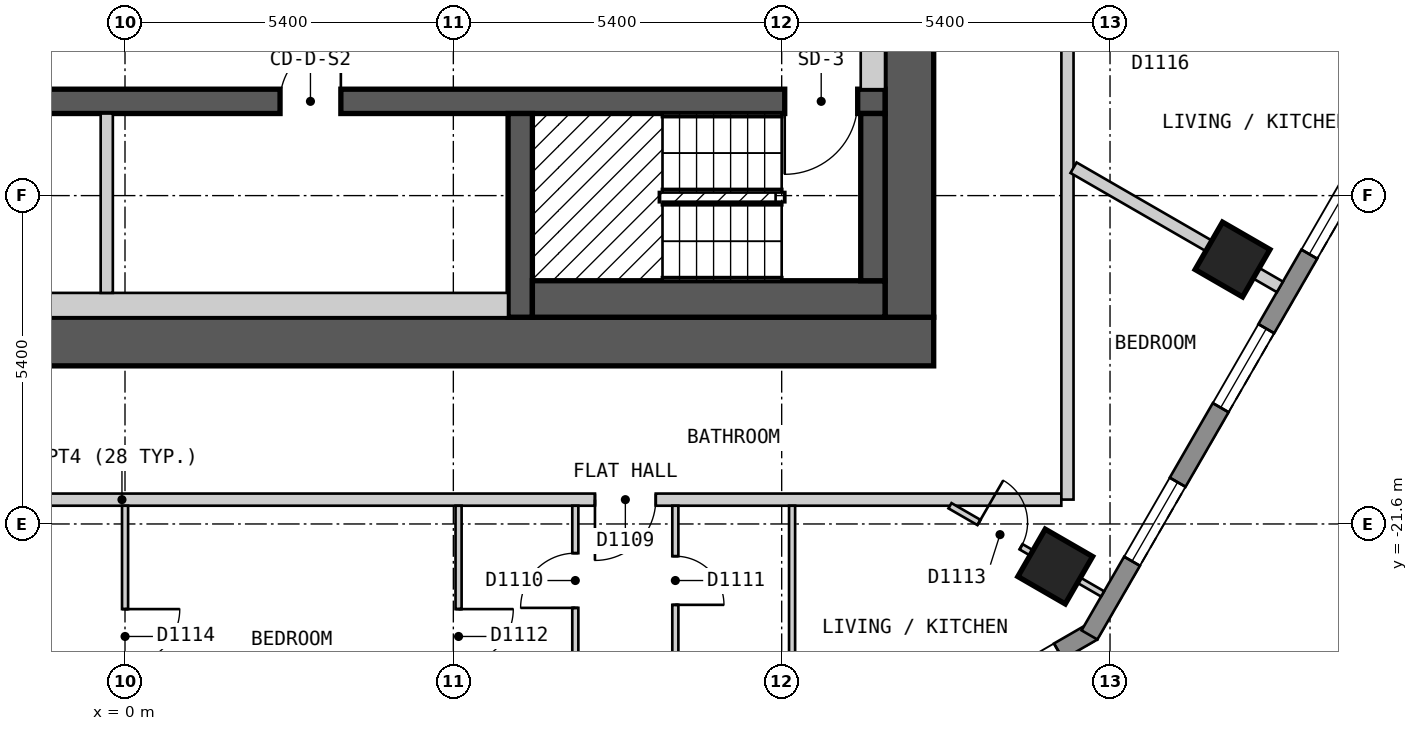
"""IFC4 building model, lengths in metres.
Left out: names, types, materials, properties, quantities, classifications, styles, units other than length and angle.
Written with IfcOpenShell. Run it as: python <this file> out.ifc"""

import sys

from ifc_helpers import new_model, si_unit, direction, frame, frame_2d, origin, origin_2d, place, context, subcontext, project, spatial, polyline, rectangle, outline, extrude, element, fill, save


model = new_model("IFC4")
c1 = context("Model", 3, precision=1e-05, world=origin(), true_north=direction((0.0, 1.0)))
c2 = subcontext(c1, "Body", "Model", "MODEL_VIEW")
j1 = project(units=[si_unit("LENGTHUNIT", "METRE"), si_unit("PLANEANGLEUNIT", "RADIAN")], contexts=[c1])
p1 = place(None, origin())
s1 = spatial("IfcSite", under=j1, at=p1, CompositionType="ELEMENT")
p2 = place(p1, origin())
s2 = spatial("IfcBuilding", under=s1, at=p2, CompositionType="ELEMENT")
p3 = place(p2, frame((0.0, 0.0, 150.6)))
s3 = spatial("IfcBuildingStorey", under=s2, at=p3, CompositionType="ELEMENT", Elevation=150.6)
for number, where, z_axis, x_axis in (
    (1, (15.299, -22.3, 0.0), (0.0, 0.0, 1.0), (0.5, 0.866, 0.0)),
    (2, (18.215, -17.251, 0.0), (0.0, 0.0, 1.0), (0.5, 0.866, 0.0)),
):
    element("IfcColumn", number, at=place(p3, frame(where, z_axis=z_axis, x_axis=x_axis)), inside=s3, PredefinedType="COLUMN", context=c2, shape_type="SweptSolid", body=[
        extrude(rectangle(XDim=0.9, YDim=0.9, at=origin_2d()), origin(), (0.0, 0.0, 1.0), 3.0),
    ])
p4 = place(p3, frame((-13.3, -18.6, 0.0), z_axis=(0.0, 0.0, 1.0), x_axis=(1.0, 0.0, 0.0)))
e3 = element("IfcWall", 3, at=p4, inside=s3, PredefinedType="SHEAR", context=c2, shape_type="SweptSolid", body=[
    extrude(rectangle(XDim=26.6, YDim=0.8, at=frame_2d((13.3, 0.0))), origin(), (0.0, 0.0, 1.0), 2.6),
])
p5 = place(p3, frame((12.9, -18.2, 0.0), z_axis=(0.0, 0.0, 1.0), x_axis=(0.0, 1.0, 0.0)))
e4 = element("IfcWall", 4, at=p5, inside=s3, PredefinedType="SHEAR", context=c2, shape_type="SweptSolid", body=[
    extrude(rectangle(XDim=12.4, YDim=0.8, at=frame_2d((6.2, 0.0))), origin(), (0.0, 0.0, 1.0), 2.6),
])
p6 = place(p3, frame((-12.5, -14.65, 0.0), z_axis=(0.0, 0.0, 1.0), x_axis=(1.0, 0.0, 0.0)))
e5 = element("IfcWall", 5, at=p6, inside=s3, PredefinedType="SHEAR", context=c2, shape_type="SweptSolid", body=[
    extrude(rectangle(XDim=25.0, YDim=0.4, at=frame_2d((12.5, 0.0))), origin(), (0.0, 0.0, 1.0), 2.6),
])
p7 = place(p6, frame((1.7, 0.0, 0.0), z_axis=(0.0, 0.0, 1.0), x_axis=(-1.0, 0.0, 0.0)))
e6 = element("IfcOpeningElement", 6, at=p7, cuts=e5, PredefinedType="OPENING", context=c2, shape_type="SweptSolid", body=[
    extrude(rectangle(XDim=1.2, YDim=2.1, at=frame_2d((0.6, 1.05))), frame((0.0, 0.21, 0.0), z_axis=(0.0, -1.0, 0.0), x_axis=(1.0, 0.0, 0.0)), (0.0, 0.0, 1.0), 0.42),
])
p8 = place(p6, frame((24.55, 0.0, 0.0), z_axis=(0.0, 0.0, 1.0), x_axis=(-1.0, 0.0, 0.0)))
e7 = element("IfcOpeningElement", 7, at=p8, cuts=e5, PredefinedType="OPENING", context=c2, shape_type="SweptSolid", body=[
    extrude(rectangle(XDim=1.2, YDim=2.1, at=frame_2d((0.6, 1.05))), frame((0.0, 0.21, 0.0), z_axis=(0.0, -1.0, 0.0), x_axis=(1.0, 0.0, 0.0)), (0.0, 0.0, 1.0), 0.42),
])
p9 = place(p6, frame((9.65, 0.0, 0.0), z_axis=(0.0, 0.0, 1.0), x_axis=(-1.0, 0.0, 0.0)))
e8 = element("IfcOpeningElement", 8, at=p9, cuts=e5, PredefinedType="OPENING", context=c2, shape_type="SweptSolid", body=[
    extrude(rectangle(XDim=1.0, YDim=2.1, at=frame_2d((0.5, 1.05))), frame((0.0, 0.21, 0.0), z_axis=(0.0, -1.0, 0.0), x_axis=(1.0, 0.0, 0.0)), (0.0, 0.0, 1.0), 0.42),
])
p10 = place(p6, frame((16.05, 0.0, 0.0), z_axis=(0.0, 0.0, 1.0), x_axis=(-1.0, 0.0, 0.0)))
e9 = element("IfcOpeningElement", 9, at=p10, cuts=e5, PredefinedType="OPENING", context=c2, shape_type="SweptSolid", body=[
    extrude(rectangle(XDim=1.0, YDim=2.1, at=frame_2d((0.5, 1.05))), frame((0.0, 0.21, 0.0), z_axis=(0.0, -1.0, 0.0), x_axis=(1.0, 0.0, 0.0)), (0.0, 0.0, 1.0), 0.42),
])
p11 = place(p3, frame((6.5, -18.2, 0.0), z_axis=(0.0, 0.0, 1.0), x_axis=(0.0, 1.0, 0.0)))
e10 = element("IfcWall", 10, at=p11, inside=s3, PredefinedType="SHEAR", context=c2, shape_type="SweptSolid", body=[
    extrude(rectangle(XDim=3.35, YDim=0.4, at=frame_2d((1.675, 0.0))), origin(), (0.0, 0.0, 1.0), 2.6),
])
p12 = place(p3, frame((11.587, -25.87, 0.0), z_axis=(0.0, 0.0, 1.0), x_axis=(0.866022959057, 0.500004234368, 0.0)))
e11 = element("IfcWall", 11, at=p12, inside=s3, PredefinedType="SOLIDWALL", context=c2, shape_type="SweptSolid", body=[
    extrude(outline(polyline([(0.0, -0.15), (5.0, -0.15), (4.92, 0.15), (0.08, 0.15), (0.0, -0.15)])), origin(), (0.0, 0.0, 1.0), 2.6),
])
p13 = place(p12, frame((0.65, 0.0, 0.15)))
e12 = element("IfcOpeningElement", 12, at=p13, cuts=e11, PredefinedType="OPENING", context=c2, shape_type="SweptSolid", body=[
    extrude(rectangle(XDim=1.2, YDim=2.1, at=frame_2d((0.6, 1.05))), frame((0.0, 0.16, 0.0), z_axis=(0.0, -1.0, 0.0), x_axis=(1.0, 0.0, 0.0)), (0.0, 0.0, 1.0), 0.32),
])
p14 = place(p12, frame((3.149, 0.0, 0.15)))
e13 = element("IfcOpeningElement", 13, at=p14, cuts=e11, PredefinedType="OPENING", context=c2, shape_type="SweptSolid", body=[
    extrude(rectangle(XDim=1.2, YDim=2.1, at=frame_2d((0.6, 1.05))), frame((0.0, 0.16, 0.0), z_axis=(0.0, -1.0, 0.0), x_axis=(1.0, 0.0, 0.0)), (0.0, 0.0, 1.0), 0.32),
])
p15 = place(p3, frame((15.862, -23.425, 0.0), z_axis=(0.0, 0.0, 1.0), x_axis=(0.500017503135, 0.866015298109, 0.0)))
e14 = element("IfcWall", 14, at=p15, inside=s3, PredefinedType="SOLIDWALL", context=c2, shape_type="SweptSolid", body=[
    extrude(outline(polyline([(0.0, -0.15), (24.711, -0.15), (24.631, 0.15), (0.08, 0.15), (0.0, -0.15)])), origin(), (0.0, 0.0, 1.0), 2.6),
])
p16 = place(p15, frame((1.4, 0.0, 0.15)))
e15 = element("IfcOpeningElement", 15, at=p16, cuts=e14, PredefinedType="OPENING", context=c2, shape_type="SweptSolid", body=[
    extrude(rectangle(XDim=1.5, YDim=2.1, at=frame_2d((0.75, 1.05))), frame((0.0, 0.16, 0.0), z_axis=(0.0, -1.0, 0.0), x_axis=(1.0, 0.0, 0.0)), (0.0, 0.0, 1.0), 0.32),
])
p17 = place(p15, frame((4.316, 0.0, 0.15)))
e16 = element("IfcOpeningElement", 16, at=p17, cuts=e14, PredefinedType="OPENING", context=c2, shape_type="SweptSolid", body=[
    extrude(rectangle(XDim=1.5, YDim=2.1, at=frame_2d((0.75, 1.05))), frame((0.0, 0.16, 0.0), z_axis=(0.0, -1.0, 0.0), x_axis=(1.0, 0.0, 0.0)), (0.0, 0.0, 1.0), 0.32),
])
p18 = place(p15, frame((7.231, 0.0, 0.15)))
e17 = element("IfcOpeningElement", 17, at=p18, cuts=e14, PredefinedType="OPENING", context=c2, shape_type="SweptSolid", body=[
    extrude(rectangle(XDim=1.5, YDim=2.1, at=frame_2d((0.75, 1.05))), frame((0.0, 0.16, 0.0), z_axis=(0.0, -1.0, 0.0), x_axis=(1.0, 0.0, 0.0)), (0.0, 0.0, 1.0), 0.32),
])
p19 = place(p15, frame((10.147, 0.0, 0.15)))
e18 = element("IfcOpeningElement", 18, at=p19, cuts=e14, PredefinedType="OPENING", context=c2, shape_type="SweptSolid", body=[
    extrude(rectangle(XDim=1.5, YDim=2.1, at=frame_2d((0.75, 1.05))), frame((0.0, 0.16, 0.0), z_axis=(0.0, -1.0, 0.0), x_axis=(1.0, 0.0, 0.0)), (0.0, 0.0, 1.0), 0.32),
])
p20 = place(p15, frame((13.062, 0.0, 0.15)))
e19 = element("IfcOpeningElement", 19, at=p20, cuts=e14, PredefinedType="OPENING", context=c2, shape_type="SweptSolid", body=[
    extrude(rectangle(XDim=1.5, YDim=2.1, at=frame_2d((0.75, 1.05))), frame((0.0, 0.16, 0.0), z_axis=(0.0, -1.0, 0.0), x_axis=(1.0, 0.0, 0.0)), (0.0, 0.0, 1.0), 0.32),
])
p21 = place(p15, frame((15.977, 0.0, 0.15)))
e20 = element("IfcOpeningElement", 20, at=p21, cuts=e14, PredefinedType="OPENING", context=c2, shape_type="SweptSolid", body=[
    extrude(rectangle(XDim=1.5, YDim=2.1, at=frame_2d((0.75, 1.05))), frame((0.0, 0.16, 0.0), z_axis=(0.0, -1.0, 0.0), x_axis=(1.0, 0.0, 0.0)), (0.0, 0.0, 1.0), 0.32),
])
p22 = place(p15, frame((18.893, 0.0, 0.15)))
e21 = element("IfcOpeningElement", 21, at=p22, cuts=e14, PredefinedType="OPENING", context=c2, shape_type="SweptSolid", body=[
    extrude(rectangle(XDim=1.5, YDim=2.1, at=frame_2d((0.75, 1.05))), frame((0.0, 0.16, 0.0), z_axis=(0.0, -1.0, 0.0), x_axis=(1.0, 0.0, 0.0)), (0.0, 0.0, 1.0), 0.32),
])
p23 = place(p15, frame((21.809, 0.0, 0.15)))
e22 = element("IfcOpeningElement", 22, at=p23, cuts=e14, PredefinedType="OPENING", context=c2, shape_type="SweptSolid", body=[
    extrude(rectangle(XDim=1.5, YDim=2.1, at=frame_2d((0.75, 1.05))), frame((0.0, 0.16, 0.0), z_axis=(0.0, -1.0, 0.0), x_axis=(1.0, 0.0, 0.0)), (0.0, 0.0, 1.0), 0.32),
])
p24 = place(p3, frame((-15.499, -21.2, 0.0), z_axis=(0.0, 0.0, 1.0), x_axis=(1.0, 0.0, 0.0)))
e23 = element("IfcWall", 23, at=p24, inside=s3, PredefinedType="PARTITIONING", context=c2, shape_type="SweptSolid", body=[
    extrude(rectangle(XDim=30.898, YDim=0.2, at=frame_2d((15.449, 0.0))), origin(), (0.0, 0.0, 1.0), 2.6),
])
p25 = place(p24, frame((6.773, 0.0, 0.0)))
e24 = element("IfcOpeningElement", 24, at=p25, cuts=e23, PredefinedType="OPENING", context=c2, shape_type="SweptSolid", body=[
    extrude(rectangle(XDim=1.0, YDim=2.1, at=frame_2d((0.5, 1.05))), frame((0.0, 0.11, 0.0), z_axis=(0.0, -1.0, 0.0), x_axis=(1.0, 0.0, 0.0)), (0.0, 0.0, 1.0), 0.22),
])
p26 = place(p24, frame((23.228, 0.0, 0.0)))
e25 = element("IfcOpeningElement", 25, at=p26, cuts=e23, PredefinedType="OPENING", context=c2, shape_type="SweptSolid", body=[
    extrude(rectangle(XDim=1.0, YDim=2.1, at=frame_2d((0.5, 1.05))), frame((0.0, 0.11, 0.0), z_axis=(0.0, -1.0, 0.0), x_axis=(1.0, 0.0, 0.0)), (0.0, 0.0, 1.0), 0.22),
])
p27 = place(p3, frame((15.5, -21.199, 0.0), z_axis=(0.0, 0.0, 1.0), x_axis=(0.0, 1.0, 0.0)))
e26 = element("IfcWall", 26, at=p27, inside=s3, PredefinedType="PARTITIONING", context=c2, shape_type="SweptSolid", body=[
    extrude(rectangle(XDim=12.147, YDim=0.2, at=frame_2d((6.073, 0.0))), origin(), (0.0, 0.0, 1.0), 2.6),
])
p28 = place(p27, frame((8.348, 0.0, 0.0)))
e27 = element("IfcOpeningElement", 27, at=p28, cuts=e26, PredefinedType="OPENING", context=c2, shape_type="SweptSolid", body=[
    extrude(rectangle(XDim=1.0, YDim=2.1, at=frame_2d((0.5, 1.05))), frame((0.0, 0.11, 0.0), z_axis=(0.0, -1.0, 0.0), x_axis=(1.0, 0.0, 0.0)), (0.0, 0.0, 1.0), 0.22),
])
p29 = place(p3, frame((7.406, -21.3, 0.0), z_axis=(0.0, 0.0, 1.0), x_axis=(0.0, -1.0, 0.0)))
e28 = element("IfcWall", 28, at=p29, inside=s3, PredefinedType="PARTITIONING", context=c2, shape_type="SweptSolid", body=[
    extrude(rectangle(XDim=2.509, YDim=0.1, at=frame_2d((1.254, 0.0))), origin(), (0.0, 0.0, 1.0), 2.6),
])
p30 = place(p29, frame((0.78, 0.0, 0.0)))
e29 = element("IfcOpeningElement", 29, at=p30, cuts=e28, PredefinedType="OPENING", context=c2, shape_type="SweptSolid", body=[
    extrude(rectangle(XDim=0.9, YDim=2.1, at=frame_2d((0.45, 1.05))), frame((0.0, 0.06, 0.0), z_axis=(0.0, -1.0, 0.0), x_axis=(1.0, 0.0, 0.0)), (0.0, 0.0, 1.0), 0.12),
])
p31 = place(p3, frame((13.568, -21.3, 0.0), z_axis=(0.0, 0.0, 1.0), x_axis=(0.865885342641, -0.500242514586, 0.0)))
e30 = element("IfcWall", 30, at=p31, inside=s3, PredefinedType="PARTITIONING", context=c2, shape_type="SweptSolid", body=[
    extrude(rectangle(XDim=2.898, YDim=0.1, at=frame_2d((1.449, 0.0))), origin(), (0.0, 0.0, 1.0), 2.6),
])
p32 = place(p31, frame((0.55, 0.0, 0.0)))
e31 = element("IfcOpeningElement", 31, at=p32, cuts=e30, PredefinedType="OPENING", context=c2, shape_type="SweptSolid", body=[
    extrude(rectangle(XDim=0.8, YDim=2.1, at=frame_2d((0.4, 1.05))), frame((0.0, 0.06, 0.0), z_axis=(0.0, -1.0, 0.0), x_axis=(1.0, 0.0, 0.0)), (0.0, 0.0, 1.0), 0.12),
])
p33 = place(p3, frame((5.486, -25.7, 0.0), z_axis=(0.0, 0.0, 1.0), x_axis=(0.0, 1.0, 0.0)))
e32 = element("IfcWall", 32, at=p33, inside=s3, PredefinedType="PARTITIONING", context=c2, shape_type="SweptSolid", body=[
    extrude(rectangle(XDim=4.4, YDim=0.1, at=frame_2d((2.2, 0.0))), origin(), (0.0, 0.0, 1.0), 2.6),
])
p34 = place(p33, frame((1.8, 0.0, 0.0)))
e33 = element("IfcOpeningElement", 33, at=p34, cuts=e32, PredefinedType="OPENING", context=c2, shape_type="SweptSolid", body=[
    extrude(rectangle(XDim=0.9, YDim=2.1, at=frame_2d((0.45, 1.05))), frame((0.0, 0.06, 0.0), z_axis=(0.0, -1.0, 0.0), x_axis=(1.0, 0.0, 0.0)), (0.0, 0.0, 1.0), 0.12),
])
p35 = place(p3, frame((9.051, -23.81, 0.0), z_axis=(0.0, 0.0, 1.0), x_axis=(0.0, 1.0, 0.0)))
e34 = element("IfcWall", 34, at=p35, inside=s3, PredefinedType="PARTITIONING", context=c2, shape_type="SweptSolid", body=[
    extrude(rectangle(XDim=2.51, YDim=0.1, at=frame_2d((1.255, 0.0))), origin(), (0.0, 0.0, 1.0), 2.6),
])
p36 = place(p35, frame((0.88, 0.0, 0.0)))
e35 = element("IfcOpeningElement", 35, at=p36, cuts=e34, PredefinedType="OPENING", context=c2, shape_type="SweptSolid", body=[
    extrude(rectangle(XDim=0.8, YDim=2.1, at=frame_2d((0.4, 1.05))), frame((0.0, 0.06, 0.0), z_axis=(0.0, -1.0, 0.0), x_axis=(1.0, 0.0, 0.0)), (0.0, 0.0, 1.0), 0.12),
])
p37 = place(p3, frame((10.971, -23.859, 0.0), z_axis=(0.0, 0.0, 1.0), x_axis=(0.0, 1.0, 0.0)))
e36 = element("IfcWall", 36, at=p37, inside=s3, PredefinedType="PARTITIONING", context=c2, shape_type="SweptSolid", body=[
    extrude(rectangle(XDim=2.559, YDim=0.1, at=frame_2d((1.279, 0.0))), origin(), (0.0, 0.0, 1.0), 2.6),
])
p38 = place(p3, frame((0.001, -25.7, 0.0), z_axis=(0.0, 0.0, 1.0), x_axis=(0.0, 1.0, 0.0)))
e37 = element("IfcWall", 37, at=p38, inside=s3, PredefinedType="PARTITIONING", context=c2, shape_type="SweptSolid", body=[
    extrude(rectangle(XDim=4.4, YDim=0.1, at=frame_2d((2.2, 0.0))), origin(), (0.0, 0.0, 1.0), 2.6),
])
p39 = place(p38, frame((1.8, 0.0, 0.0)))
e38 = element("IfcOpeningElement", 38, at=p39, cuts=e37, PredefinedType="OPENING", context=c2, shape_type="SweptSolid", body=[
    extrude(rectangle(XDim=0.9, YDim=2.1, at=frame_2d((0.45, 1.05))), frame((0.0, 0.06, 0.0), z_axis=(0.0, -1.0, 0.0), x_axis=(1.0, 0.0, 0.0)), (0.0, 0.0, 1.0), 0.12),
])
p40 = place(p3, frame((15.6, -15.741, 0.0), z_axis=(0.0, 0.0, 1.0), x_axis=(0.865964599155, -0.500105301922, 0.0)))
e39 = element("IfcWall", 39, at=p40, inside=s3, PredefinedType="PARTITIONING", context=c2, shape_type="SweptSolid", body=[
    extrude(rectangle(XDim=3.919, YDim=0.2, at=frame_2d((1.959, 0.0))), origin(), (0.0, 0.0, 1.0), 2.6),
])
p41 = place(p3, frame((-6.3, -18.0, 0.0), z_axis=(0.0, 0.0, 1.0), x_axis=(1.0, 0.0, 0.0)))
e40 = element("IfcWall", 40, at=p41, inside=s3, PredefinedType="PARTITIONING", context=c2, shape_type="SweptSolid", body=[
    extrude(rectangle(XDim=12.6, YDim=0.4, at=frame_2d((6.3, 0.0))), origin(), (0.0, 0.0, 1.0), 2.6),
])
p42 = place(p3, frame((-0.3, -17.8, 0.0), z_axis=(0.0, 0.0, 1.0), x_axis=(0.0, 1.0, 0.0)))
e41 = element("IfcWall", 41, at=p42, inside=s3, PredefinedType="PARTITIONING", context=c2, shape_type="SweptSolid", body=[
    extrude(rectangle(XDim=2.95, YDim=0.2, at=frame_2d((1.475, 0.0))), origin(), (0.0, 0.0, 1.0), 2.6),
])
p43 = place(p3, frame((6.7, -17.9, 0.0), z_axis=(0.0, 0.0, 1.0), x_axis=(1.0, 0.0, 0.0)))
e42 = element("IfcWall", 42, at=p43, inside=s3, PredefinedType="SOLIDWALL", context=c2, shape_type="SweptSolid", body=[
    extrude(rectangle(XDim=5.8, YDim=0.6, at=frame_2d((2.9, 0.0))), origin(), (0.0, 0.0, 1.0), 2.6),
])
p44 = place(p3, frame((12.3, -17.6, 0.0), z_axis=(0.0, 0.0, 1.0), x_axis=(0.0, 1.0, 0.0)))
e43 = element("IfcWall", 43, at=p44, inside=s3, PredefinedType="SOLIDWALL", context=c2, shape_type="SweptSolid", body=[
    extrude(rectangle(XDim=2.75, YDim=0.4, at=frame_2d((1.375, 0.0))), origin(), (0.0, 0.0, 1.0), 2.6),
])
p45 = place(p3, frame((12.3, -14.45, 0.0), z_axis=(0.0, 0.0, 1.0), x_axis=(0.0, 1.0, 0.0)))
e44 = element("IfcWall", 44, at=p45, inside=s3, PredefinedType="PARTITIONING", context=c2, shape_type="SweptSolid", body=[
    extrude(rectangle(XDim=8.25, YDim=0.4, at=frame_2d((4.125, 0.0))), origin(), (0.0, 0.0, 1.0), 2.6),
])
p46 = place(p14, origin())
e45 = element("IfcWindow", 45, at=p46, inside=s3, PartitioningType="SINGLE_PANEL", PredefinedType="WINDOW", context=c2, shape_type="SweptSolid", body=[
    extrude(rectangle(XDim=1.2, YDim=2.1, at=frame_2d((0.6, 1.05))), frame((0.0, 0.03, 0.0), z_axis=(0.0, -1.0, 0.0), x_axis=(1.0, 0.0, 0.0)), (0.0, 0.0, 1.0), 0.06),
])
fill(e13, e45)
p47 = place(p16, origin())
e46 = element("IfcWindow", 46, at=p47, inside=s3, PartitioningType="SINGLE_PANEL", PredefinedType="WINDOW", context=c2, shape_type="SweptSolid", body=[
    extrude(rectangle(XDim=1.5, YDim=2.1, at=frame_2d((0.75, 1.05))), frame((0.0, 0.03, 0.0), z_axis=(0.0, -1.0, 0.0), x_axis=(1.0, 0.0, 0.0)), (0.0, 0.0, 1.0), 0.06),
])
fill(e15, e46)
p48 = place(p17, origin())
e47 = element("IfcWindow", 47, at=p48, inside=s3, PartitioningType="SINGLE_PANEL", PredefinedType="WINDOW", context=c2, shape_type="SweptSolid", body=[
    extrude(rectangle(XDim=1.5, YDim=2.1, at=frame_2d((0.75, 1.05))), frame((0.0, 0.03, 0.0), z_axis=(0.0, -1.0, 0.0), x_axis=(1.0, 0.0, 0.0)), (0.0, 0.0, 1.0), 0.06),
])
fill(e16, e47)
p49 = place(p18, origin())
e48 = element("IfcWindow", 48, at=p49, inside=s3, PartitioningType="SINGLE_PANEL", PredefinedType="WINDOW", context=c2, shape_type="SweptSolid", body=[
    extrude(rectangle(XDim=1.5, YDim=2.1, at=frame_2d((0.75, 1.05))), frame((0.0, 0.03, 0.0), z_axis=(0.0, -1.0, 0.0), x_axis=(1.0, 0.0, 0.0)), (0.0, 0.0, 1.0), 0.06),
])
fill(e17, e48)
p50 = place(p26, origin())
e49 = element("IfcDoor", 49, at=p50, inside=s3, OperationType="SINGLE_SWING_LEFT", PredefinedType="DOOR", context=c2, shape_type="SweptSolid", body=[
    extrude(rectangle(XDim=1.0, YDim=2.1, at=frame_2d((0.5, 1.05))), frame((0.0, 0.025, 0.0), z_axis=(0.0, -1.0, 0.0), x_axis=(1.0, 0.0, 0.0)), (0.0, 0.0, 1.0), 0.05),
])
fill(e25, e49)
p51 = place(p30, origin())
e50 = element("IfcDoor", 50, at=p51, inside=s3, OperationType="SINGLE_SWING_RIGHT", PredefinedType="DOOR", context=c2, shape_type="SweptSolid", body=[
    extrude(rectangle(XDim=0.9, YDim=2.1, at=frame_2d((0.45, 1.05))), frame((0.0, 0.025, 0.0), z_axis=(0.0, -1.0, 0.0), x_axis=(1.0, 0.0, 0.0)), (0.0, 0.0, 1.0), 0.05),
])
fill(e29, e50)
p52 = place(p36, origin())
e51 = element("IfcDoor", 51, at=p52, inside=s3, OperationType="SINGLE_SWING_LEFT", PredefinedType="DOOR", context=c2, shape_type="SweptSolid", body=[
    extrude(rectangle(XDim=0.8, YDim=2.1, at=frame_2d((0.4, 1.05))), frame((0.0, 0.025, 0.0), z_axis=(0.0, -1.0, 0.0), x_axis=(1.0, 0.0, 0.0)), (0.0, 0.0, 1.0), 0.05),
])
fill(e35, e51)
p53 = place(p34, origin())
e52 = element("IfcDoor", 52, at=p53, inside=s3, OperationType="SINGLE_SWING_RIGHT", PredefinedType="DOOR", context=c2, shape_type="SweptSolid", body=[
    extrude(rectangle(XDim=0.9, YDim=2.1, at=frame_2d((0.45, 1.05))), frame((0.0, 0.025, 0.0), z_axis=(0.0, -1.0, 0.0), x_axis=(1.0, 0.0, 0.0)), (0.0, 0.0, 1.0), 0.05),
])
fill(e33, e52)
p54 = place(p32, origin())
e53 = element("IfcDoor", 53, at=p54, inside=s3, OperationType="SINGLE_SWING_LEFT", PredefinedType="DOOR", context=c2, shape_type="SweptSolid", body=[
    extrude(rectangle(XDim=0.8, YDim=2.1, at=frame_2d((0.4, 1.05))), frame((0.0, 0.025, 0.0), z_axis=(0.0, -1.0, 0.0), x_axis=(1.0, 0.0, 0.0)), (0.0, 0.0, 1.0), 0.05),
])
fill(e31, e53)
p55 = place(p39, origin())
e54 = element("IfcDoor", 54, at=p55, inside=s3, OperationType="SINGLE_SWING_RIGHT", PredefinedType="DOOR", context=c2, shape_type="SweptSolid", body=[
    extrude(rectangle(XDim=0.9, YDim=2.1, at=frame_2d((0.45, 1.05))), frame((0.0, 0.025, 0.0), z_axis=(0.0, -1.0, 0.0), x_axis=(1.0, 0.0, 0.0)), (0.0, 0.0, 1.0), 0.05),
])
fill(e38, e54)
p56 = place(p8, origin())
e55 = element("IfcDoor", 55, at=p56, inside=s3, OperationType="SINGLE_SWING_RIGHT", PredefinedType="DOOR", context=c2, shape_type="SweptSolid", body=[
    extrude(rectangle(XDim=1.2, YDim=2.1, at=frame_2d((0.6, 1.05))), frame((0.0, 0.025, 0.0), z_axis=(0.0, -1.0, 0.0), x_axis=(1.0, 0.0, 0.0)), (0.0, 0.0, 1.0), 0.05),
])
fill(e7, e55)
p57 = place(p10, origin())
e56 = element("IfcDoor", 56, at=p57, inside=s3, OperationType="SINGLE_SWING_LEFT", PredefinedType="DOOR", context=c2, shape_type="SweptSolid", body=[
    extrude(rectangle(XDim=1.0, YDim=2.1, at=frame_2d((0.5, 1.05))), frame((0.0, 0.025, 0.0), z_axis=(0.0, -1.0, 0.0), x_axis=(1.0, 0.0, 0.0)), (0.0, 0.0, 1.0), 0.05),
])
fill(e9, e56)
save(model, sys.argv[1])
